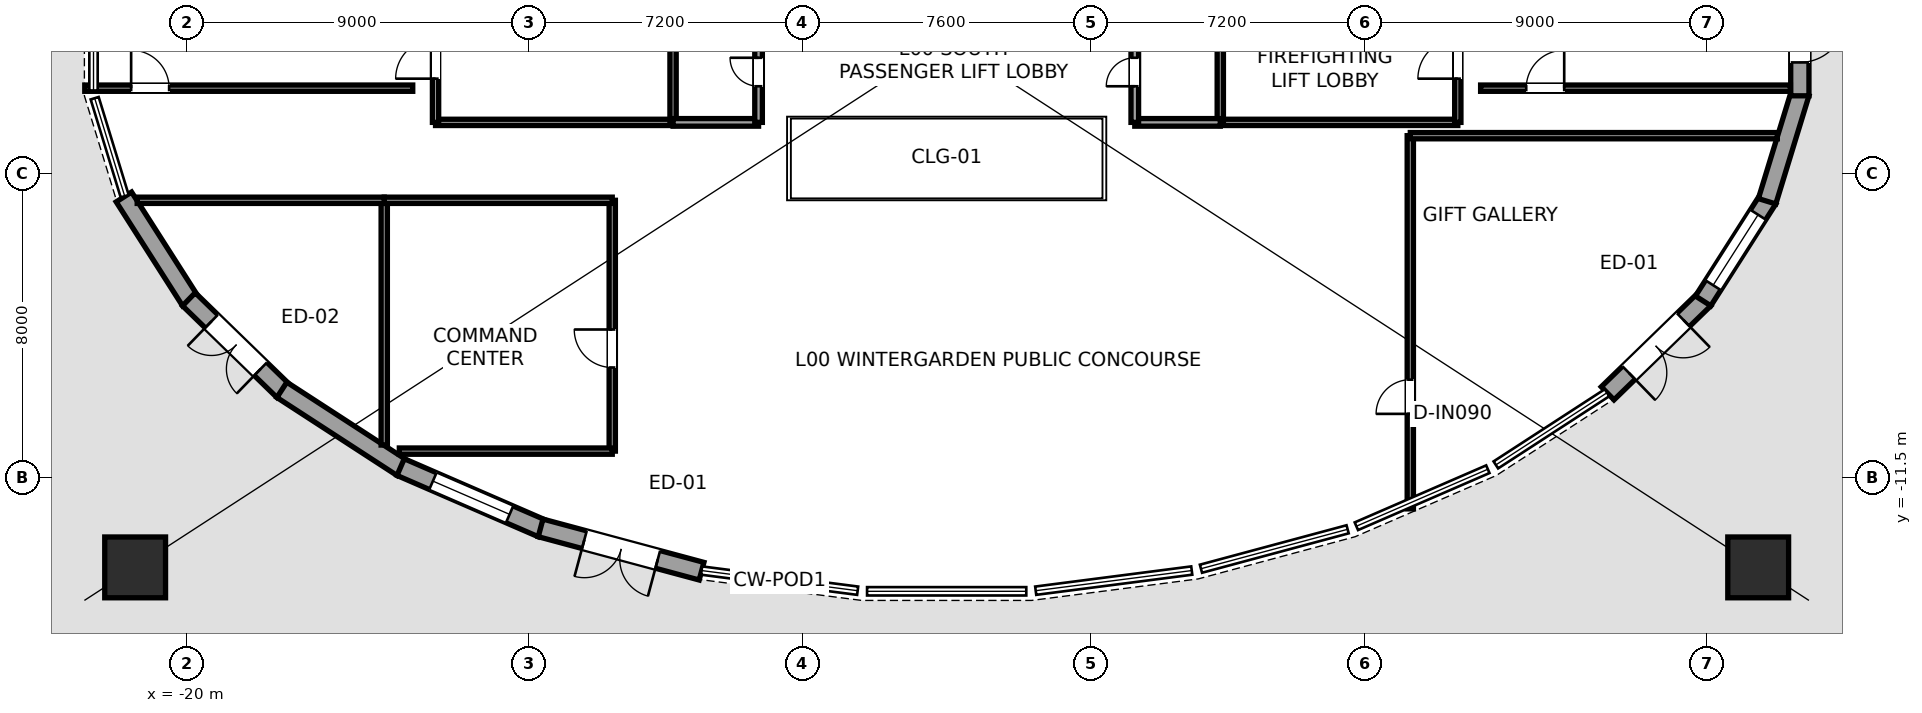
"""IFC4 building model, lengths in metres.
Left out: names, types, materials, properties, quantities, classifications, styles, units other than length and angle.
Written with IfcOpenShell. Run it as: python <this file> out.ifc"""

import sys

from ifc_helpers import new_model, si_unit, direction, frame, frame_2d, origin, origin_2d, place, context, subcontext, project, spatial, rectangle, hollow_circle, extrude, element, fill, save


model = new_model("IFC4")
c1 = context("Model", 3, precision=1e-05, world=origin(), true_north=direction((0.0, 1.0)))
c2 = subcontext(c1, "Body", "Model", "MODEL_VIEW")
j1 = project(units=[si_unit("LENGTHUNIT", "METRE"), si_unit("PLANEANGLEUNIT", "RADIAN")], contexts=[c1])
p1 = place(None, origin())
s1 = spatial("IfcSite", under=j1, at=p1, CompositionType="ELEMENT")
p2 = place(p1, origin())
s2 = spatial("IfcBuilding", under=s1, at=p2, CompositionType="ELEMENT")
p3 = place(p2, origin())
s3 = spatial("IfcBuildingStorey", under=s2, at=p3, CompositionType="ELEMENT", Elevation=0.0)
for number, where, z_axis, x_axis in (
    (1, (-21.354, -13.859, 0.0), (0.0, 0.0, 1.0), (1.0, 0.0, 0.0)),
    (2, (21.354, -13.859, 0.0), (0.0, 0.0, 1.0), (1.0, 0.0, 0.0)),
):
    element("IfcColumn", number, at=place(p3, frame(where, z_axis=z_axis, x_axis=x_axis)), inside=s3, PredefinedType="USERDEFINED", context=c2, shape_type="SweptSolid", body=[
        extrude(hollow_circle(Radius=0.8, WallThickness=0.06, at=origin_2d()), origin(), (0.0, 0.0, 1.0), 6.0),
    ])
p4 = place(p3, frame((-19.906, -6.848, 0.0), z_axis=(0.0, 0.0, 1.0), x_axis=(-0.537902363654, 0.843007145388, 0.0)))
e3 = element("IfcWall", 3, at=p4, inside=s3, PredefinedType="STANDARD", context=c2, shape_type="SweptSolid", body=[
    extrude(rectangle(XDim=3.245, YDim=0.48, at=frame_2d((1.623, 0.0))), origin(), (0.0, 0.0, 1.0), 4.913),
])
p5 = place(p3, frame((-17.458, -9.217, 0.0), z_axis=(0.0, 0.0, 1.0), x_axis=(-0.717293479468, 0.696771170696, 0.0)))
e4 = element("IfcWall", 4, at=p5, inside=s3, PredefinedType="STANDARD", context=c2, shape_type="SweptSolid", body=[
    extrude(rectangle(XDim=3.462, YDim=0.48, at=frame_2d((1.731, 0.0))), origin(), (0.0, 0.0, 1.0), 4.913),
])
p6 = place(p5, frame((0.831, 0.0, 0.0)))
e5 = element("IfcOpeningElement", 5, at=p6, cuts=e4, PredefinedType="OPENING", context=c2, shape_type="SweptSolid", body=[
    extrude(rectangle(XDim=1.8, YDim=2.3, at=frame_2d((0.9, 1.15))), frame((0.0, 0.25, 0.0), z_axis=(0.0, -1.0, 0.0), x_axis=(1.0, 0.0, 0.0)), (0.0, 0.0, 1.0), 0.5),
])
p7 = place(p3, frame((-14.333, -11.239, 0.0), z_axis=(0.0, 0.0, 1.0), x_axis=(-0.838776546814, 0.544475807098, 0.0)))
e6 = element("IfcWall", 6, at=p7, inside=s3, PredefinedType="STANDARD", context=c2, shape_type="SweptSolid", body=[
    extrude(rectangle(XDim=3.768, YDim=0.48, at=frame_2d((1.884, 0.0))), origin(), (0.0, 0.0, 1.0), 4.913),
])
p8 = place(p3, frame((-10.652, -12.832, 0.0), z_axis=(0.0, 0.0, 1.0), x_axis=(-0.917428047281, 0.3979017191, 0.0)))
e7 = element("IfcWall", 7, at=p8, inside=s3, PredefinedType="STANDARD", context=c2, shape_type="SweptSolid", body=[
    extrude(rectangle(XDim=4.051, YDim=0.48, at=frame_2d((2.025, 0.0))), origin(), (0.0, 0.0, 1.0), 4.913),
])
p9 = place(p8, frame((0.925, 0.0, 0.85)))
e8 = element("IfcOpeningElement", 8, at=p9, cuts=e7, PredefinedType="OPENING", context=c2, shape_type="SweptSolid", body=[
    extrude(rectangle(XDim=2.2, YDim=1.95, at=frame_2d((1.1, 0.975))), frame((0.0, 0.25, 0.0), z_axis=(0.0, -1.0, 0.0), x_axis=(1.0, 0.0, 0.0)), (0.0, 0.0, 1.0), 0.5),
])
p10 = place(p3, frame((-6.45, -13.959, 0.0), z_axis=(0.0, 0.0, 1.0), x_axis=(-0.965697937954, 0.259668043147, 0.0)))
e9 = element("IfcWall", 9, at=p10, inside=s3, PredefinedType="STANDARD", context=c2, shape_type="SweptSolid", body=[
    extrude(rectangle(XDim=4.386, YDim=0.48, at=frame_2d((2.193, 0.0))), origin(), (0.0, 0.0, 1.0), 4.913),
])
p11 = place(p10, frame((1.193, 0.0, 0.0)))
e10 = element("IfcOpeningElement", 10, at=p11, cuts=e9, PredefinedType="OPENING", context=c2, shape_type="SweptSolid", body=[
    extrude(rectangle(XDim=2.0, YDim=2.4, at=frame_2d((1.0, 1.2))), frame((0.0, 0.25, 0.0), z_axis=(0.0, -1.0, 0.0), x_axis=(1.0, 0.0, 0.0)), (0.0, 0.0, 1.0), 0.5),
])
p12 = place(p3, frame((19.941, -6.805, 0.0), z_axis=(0.0, 0.0, 1.0), x_axis=(-0.717307843808, -0.696756382971, 0.0)))
e11 = element("IfcWall", 11, at=p12, inside=s3, PredefinedType="STANDARD", context=c2, shape_type="SweptSolid", body=[
    extrude(rectangle(XDim=3.552, YDim=0.48, at=frame_2d((1.776, 0.0))), origin(), (0.0, 0.0, 1.0), 4.913),
])
p13 = place(p12, frame((0.776, 0.0, 0.0)))
e12 = element("IfcOpeningElement", 12, at=p13, cuts=e11, PredefinedType="OPENING", context=c2, shape_type="SweptSolid", body=[
    extrude(rectangle(XDim=2.0, YDim=2.4, at=frame_2d((1.0, 1.2))), frame((0.0, 0.25, 0.0), z_axis=(0.0, -1.0, 0.0), x_axis=(1.0, 0.0, 0.0)), (0.0, 0.0, 1.0), 0.5),
])
p14 = place(p3, frame((21.616, -4.167, 0.0), z_axis=(0.0, 0.0, 1.0), x_axis=(-0.537898487212, -0.843009618839, 0.0)))
e13 = element("IfcWall", 13, at=p14, inside=s3, PredefinedType="STANDARD", context=c2, shape_type="SweptSolid", body=[
    extrude(rectangle(XDim=3.18, YDim=0.48, at=frame_2d((1.59, 0.0))), origin(), (0.0, 0.0, 1.0), 4.913),
])
p15 = place(p14, frame((0.49, 0.0, 0.85)))
e14 = element("IfcOpeningElement", 14, at=p15, cuts=e13, PredefinedType="OPENING", context=c2, shape_type="SweptSolid", body=[
    extrude(rectangle(XDim=2.2, YDim=1.95, at=frame_2d((1.1, 0.975))), frame((0.0, 0.25, 0.0), z_axis=(0.0, -1.0, 0.0), x_axis=(1.0, 0.0, 0.0)), (0.0, 0.0, 1.0), 0.5),
])
p16 = place(p3, frame((22.461, -1.38, 0.0), z_axis=(0.0, 0.0, 1.0), x_axis=(-0.29302499195, -0.956104781963, 0.0)))
e15 = element("IfcWall", 15, at=p16, inside=s3, PredefinedType="STANDARD", context=c2, shape_type="SweptSolid", body=[
    extrude(rectangle(XDim=2.976, YDim=0.48, at=frame_2d((1.488, 0.0))), origin(), (0.0, 0.0, 1.0), 4.913),
])
p17 = place(p3, frame((22.45, 1.506, 0.0), z_axis=(0.0, 0.0, 1.0), x_axis=(0.0, -1.0, 0.0)))
e16 = element("IfcWall", 16, at=p17, inside=s3, PredefinedType="STANDARD", context=c2, shape_type="SweptSolid", body=[
    extrude(rectangle(XDim=2.956, YDim=0.48, at=frame_2d((1.478, 0.0))), origin(), (0.0, 0.0, 1.0), 4.913),
])
p18 = place(p17, frame((0.878, 0.0, 0.0)))
e17 = element("IfcOpeningElement", 17, at=p18, cuts=e16, PredefinedType="OPENING", context=c2, shape_type="SweptSolid", body=[
    extrude(rectangle(XDim=1.2, YDim=2.2, at=frame_2d((0.6, 1.1))), frame((0.0, 0.25, 0.0), z_axis=(0.0, -1.0, 0.0), x_axis=(1.0, 0.0, 0.0)), (0.0, 0.0, 1.0), 0.5),
])
p19 = place(p3, frame((-13.45, -2.15, 0.0), z_axis=(0.0, 0.0, 1.0), x_axis=(1.0, 0.0, 0.0)))
e18 = element("IfcWall", 18, at=p19, inside=s3, PredefinedType="PARTITIONING", context=c2, shape_type="SweptSolid", body=[
    extrude(rectangle(XDim=6.25, YDim=0.165, at=frame_2d((3.125, 0.0))), origin(), (0.0, 0.0, 1.0), 5.78),
])
p20 = place(p3, frame((-13.45, -2.15, 0.0), z_axis=(0.0, 0.0, 1.0), x_axis=(0.0, 1.0, 0.0)))
e19 = element("IfcWall", 19, at=p20, inside=s3, PredefinedType="PARTITIONING", context=c2, shape_type="SweptSolid", body=[
    extrude(rectangle(XDim=3.15, YDim=0.165, at=frame_2d((1.575, 0.0))), origin(), (0.0, 0.0, 1.0), 5.233),
])
p21 = place(p20, frame((1.15, 0.0, 0.0)))
e20 = element("IfcOpeningElement", 20, at=p21, cuts=e19, PredefinedType="OPENING", context=c2, shape_type="SweptSolid", body=[
    extrude(rectangle(XDim=1.05, YDim=2.15, at=frame_2d((0.525, 1.075))), frame((0.0, 0.093, 0.0), z_axis=(0.0, -1.0, 0.0), x_axis=(1.0, 0.0, 0.0)), (0.0, 0.0, 1.0), 0.185),
])
p22 = place(p3, frame((-7.2, -2.15, 0.0), z_axis=(0.0, 0.0, 1.0), x_axis=(0.0, 1.0, 0.0)))
e21 = element("IfcWall", 21, at=p22, inside=s3, PredefinedType="PARTITIONING", context=c2, shape_type="SweptSolid", body=[
    extrude(rectangle(XDim=3.15, YDim=0.165, at=frame_2d((1.575, 0.0))), origin(), (0.0, 0.0, 1.0), 5.78),
])
p23 = place(p3, frame((-7.2, -2.15, 0.0), z_axis=(0.0, 0.0, 1.0), x_axis=(1.0, 0.0, 0.0)))
e22 = element("IfcWall", 22, at=p23, inside=s3, PredefinedType="SOLIDWALL", context=c2, shape_type="SweptSolid", body=[
    extrude(rectangle(XDim=2.25, YDim=0.2, at=frame_2d((1.125, 0.0))), origin(), (0.0, 0.0, 1.0), 5.78),
])
p24 = place(p3, frame((-4.95, -2.15, 0.0), z_axis=(0.0, 0.0, 1.0), x_axis=(0.0, 1.0, 0.0)))
e23 = element("IfcWall", 23, at=p24, inside=s3, PredefinedType="SOLIDWALL", context=c2, shape_type="SweptSolid", body=[
    extrude(rectangle(XDim=3.15, YDim=0.2, at=frame_2d((1.575, 0.0))), origin(), (0.0, 0.0, 1.0), 5.148),
])
p25 = place(p24, frame((0.95, 0.0, 0.0)))
e24 = element("IfcOpeningElement", 24, at=p25, cuts=e23, PredefinedType="OPENING", context=c2, shape_type="SweptSolid", body=[
    extrude(rectangle(XDim=0.75, YDim=2.1, at=frame_2d((0.375, 1.05))), frame((0.0, 0.11, 0.0), z_axis=(0.0, -1.0, 0.0), x_axis=(1.0, 0.0, 0.0)), (0.0, 0.0, 1.0), 0.22),
])
p26 = place(p3, frame((7.2, -2.15, 0.0), z_axis=(0.0, 0.0, 1.0), x_axis=(1.0, 0.0, 0.0)))
e25 = element("IfcWall", 25, at=p26, inside=s3, PredefinedType="PARTITIONING", context=c2, shape_type="SweptSolid", body=[
    extrude(rectangle(XDim=6.25, YDim=0.165, at=frame_2d((3.125, 0.0))), origin(), (0.0, 0.0, 1.0), 5.78),
])
p27 = place(p3, frame((7.2, -2.15, 0.0), z_axis=(0.0, 0.0, 1.0), x_axis=(0.0, 1.0, 0.0)))
e26 = element("IfcWall", 26, at=p27, inside=s3, PredefinedType="PARTITIONING", context=c2, shape_type="SweptSolid", body=[
    extrude(rectangle(XDim=3.15, YDim=0.165, at=frame_2d((1.575, 0.0))), origin(), (0.0, 0.0, 1.0), 5.78),
])
p28 = place(p3, frame((13.45, -2.15, 0.0), z_axis=(0.0, 0.0, 1.0), x_axis=(0.0, 1.0, 0.0)))
e27 = element("IfcWall", 27, at=p28, inside=s3, PredefinedType="PARTITIONING", context=c2, shape_type="SweptSolid", body=[
    extrude(rectangle(XDim=3.15, YDim=0.165, at=frame_2d((1.575, 0.0))), origin(), (0.0, 0.0, 1.0), 5.233),
])
p29 = place(p28, frame((1.15, 0.0, 0.0)))
e28 = element("IfcOpeningElement", 28, at=p29, cuts=e27, PredefinedType="OPENING", context=c2, shape_type="SweptSolid", body=[
    extrude(rectangle(XDim=1.05, YDim=2.15, at=frame_2d((0.525, 1.075))), frame((0.0, 0.093, 0.0), z_axis=(0.0, -1.0, 0.0), x_axis=(1.0, 0.0, 0.0)), (0.0, 0.0, 1.0), 0.185),
])
p30 = place(p3, frame((4.95, -2.15, 0.0), z_axis=(0.0, 0.0, 1.0), x_axis=(1.0, 0.0, 0.0)))
e29 = element("IfcWall", 29, at=p30, inside=s3, PredefinedType="SOLIDWALL", context=c2, shape_type="SweptSolid", body=[
    extrude(rectangle(XDim=2.25, YDim=0.2, at=frame_2d((1.125, 0.0))), origin(), (0.0, 0.0, 1.0), 5.78),
])
p31 = place(p3, frame((4.95, -2.15, 0.0), z_axis=(0.0, 0.0, 1.0), x_axis=(0.0, 1.0, 0.0)))
e30 = element("IfcWall", 30, at=p31, inside=s3, PredefinedType="SOLIDWALL", context=c2, shape_type="SweptSolid", body=[
    extrude(rectangle(XDim=3.15, YDim=0.2, at=frame_2d((1.575, 0.0))), origin(), (0.0, 0.0, 1.0), 5.148),
])
p32 = place(p31, frame((0.95, 0.0, 0.0)))
e31 = element("IfcOpeningElement", 31, at=p32, cuts=e30, PredefinedType="OPENING", context=c2, shape_type="SweptSolid", body=[
    extrude(rectangle(XDim=0.75, YDim=2.1, at=frame_2d((0.375, 1.05))), frame((0.0, 0.11, 0.0), z_axis=(0.0, -1.0, 0.0), x_axis=(1.0, 0.0, 0.0)), (0.0, 0.0, 1.0), 0.22),
])
p33 = place(p3, frame((-14.8, -10.641, 0.0), z_axis=(0.0, 0.0, 1.0), x_axis=(0.0, 1.0, 0.0)))
e32 = element("IfcWall", 32, at=p33, inside=s3, PredefinedType="PARTITIONING", context=c2, shape_type="SweptSolid", body=[
    extrude(rectangle(XDim=6.441, YDim=0.165, at=frame_2d((3.22, 0.0))), origin(), (0.0, 0.0, 1.0), 5.233),
])
p34 = place(p3, frame((-8.8, -10.8, 0.0), z_axis=(0.0, 0.0, 1.0), x_axis=(0.0, 1.0, 0.0)))
e33 = element("IfcWall", 33, at=p34, inside=s3, PredefinedType="PARTITIONING", context=c2, shape_type="SweptSolid", body=[
    extrude(rectangle(XDim=6.6, YDim=0.165, at=frame_2d((3.3, 0.0))), origin(), (0.0, 0.0, 1.0), 5.78),
])
p35 = place(p34, frame((2.2, 0.0, 0.0)))
e34 = element("IfcOpeningElement", 34, at=p35, cuts=e33, PredefinedType="OPENING", context=c2, shape_type="SweptSolid", body=[
    extrude(rectangle(XDim=1.0, YDim=2.15, at=frame_2d((0.5, 1.075))), frame((0.0, 0.093, 0.0), z_axis=(0.0, -1.0, 0.0), x_axis=(1.0, 0.0, 0.0)), (0.0, 0.0, 1.0), 0.185),
])
p36 = place(p3, frame((-14.403, -10.8, 0.0), z_axis=(0.0, 0.0, 1.0), x_axis=(1.0, 0.0, 0.0)))
e35 = element("IfcWall", 35, at=p36, inside=s3, PredefinedType="PARTITIONING", context=c2, shape_type="SweptSolid", body=[
    extrude(rectangle(XDim=5.603, YDim=0.165, at=frame_2d((2.802, 0.0))), origin(), (0.0, 0.0, 1.0), 5.78),
])
p37 = place(p3, frame((-14.8, -4.2, 0.0), z_axis=(0.0, 0.0, 1.0), x_axis=(1.0, 0.0, 0.0)))
e36 = element("IfcWall", 36, at=p37, inside=s3, PredefinedType="PARTITIONING", context=c2, shape_type="SweptSolid", body=[
    extrude(rectangle(XDim=6.0, YDim=0.165, at=frame_2d((3.0, 0.0))), origin(), (0.0, 0.0, 1.0), 5.307),
])
p38 = place(p3, frame((-21.301, -4.2, 0.0), z_axis=(0.0, 0.0, 1.0), x_axis=(1.0, 0.0, 0.0)))
e37 = element("IfcWall", 37, at=p38, inside=s3, PredefinedType="PARTITIONING", context=c2, shape_type="SweptSolid", body=[
    extrude(rectangle(XDim=6.501, YDim=0.165, at=frame_2d((3.25, 0.0))), origin(), (0.0, 0.0, 1.0), 5.233),
])
p39 = place(p3, frame((12.2, -12.32, 0.0), z_axis=(0.0, 0.0, 1.0), x_axis=(0.0, 1.0, 0.0)))
e38 = element("IfcWall", 38, at=p39, inside=s3, PredefinedType="PARTITIONING", context=c2, shape_type="SweptSolid", body=[
    extrude(rectangle(XDim=9.82, YDim=0.165, at=frame_2d((4.91, 0.0))), origin(), (0.0, 0.0, 1.0), 5.78),
])
p40 = place(p39, frame((2.5, 0.0, 0.0)))
e39 = element("IfcOpeningElement", 39, at=p40, cuts=e38, PredefinedType="OPENING", context=c2, shape_type="SweptSolid", body=[
    extrude(rectangle(XDim=0.9, YDim=2.1, at=frame_2d((0.45, 1.05))), frame((0.0, 0.093, 0.0), z_axis=(0.0, -1.0, 0.0), x_axis=(1.0, 0.0, 0.0)), (0.0, 0.0, 1.0), 0.185),
])
p41 = place(p3, frame((12.2, -2.5, 0.0), z_axis=(0.0, 0.0, 1.0), x_axis=(1.0, 0.0, 0.0)))
e40 = element("IfcWall", 40, at=p41, inside=s3, PredefinedType="PARTITIONING", context=c2, shape_type="SweptSolid", body=[
    extrude(rectangle(XDim=9.658, YDim=0.165, at=frame_2d((4.829, 0.0))), origin(), (0.0, 0.0, 1.0), 5.233),
])
p42 = place(p3, frame((-22.68, -1.25, 0.0), z_axis=(0.0, 0.0, 1.0), x_axis=(1.0, 0.0, 0.0)))
e41 = element("IfcWall", 41, at=p42, inside=s3, PredefinedType="PARTITIONING", context=c2, shape_type="SweptSolid", body=[
    extrude(rectangle(XDim=8.63, YDim=0.165, at=frame_2d((4.315, 0.0))), origin(), (0.0, 0.0, 1.0), 5.148),
])
p43 = place(p42, frame((1.22, 0.0, 0.0)))
e42 = element("IfcOpeningElement", 42, at=p43, cuts=e41, PredefinedType="OPENING", context=c2, shape_type="SweptSolid", body=[
    extrude(rectangle(XDim=1.0, YDim=2.15, at=frame_2d((0.5, 1.075))), frame((0.0, 0.093, 0.0), z_axis=(0.0, -1.0, 0.0), x_axis=(1.0, 0.0, 0.0)), (0.0, 0.0, 1.0), 0.185),
])
p44 = place(p3, frame((14.05, -1.25, 0.0), z_axis=(0.0, 0.0, 1.0), x_axis=(1.0, 0.0, 0.0)))
e43 = element("IfcWall", 43, at=p44, inside=s3, PredefinedType="PARTITIONING", context=c2, shape_type="SweptSolid", body=[
    extrude(rectangle(XDim=8.152, YDim=0.165, at=frame_2d((4.076, 0.0))), origin(), (0.0, 0.0, 1.0), 5.148),
])
p45 = place(p44, frame((1.2, 0.0, 0.0)))
e44 = element("IfcOpeningElement", 44, at=p45, cuts=e43, PredefinedType="OPENING", context=c2, shape_type="SweptSolid", body=[
    extrude(rectangle(XDim=1.0, YDim=2.15, at=frame_2d((0.5, 1.075))), frame((0.0, 0.093, 0.0), z_axis=(0.0, -1.0, 0.0), x_axis=(1.0, 0.0, 0.0)), (0.0, 0.0, 1.0), 0.185),
])
p46 = place(p6, origin())
e45 = element("IfcDoor", 45, at=p46, inside=s3, OperationType="DOUBLE_DOOR_SINGLE_SWING", PredefinedType="DOOR", context=c2, shape_type="SweptSolid", body=[
    extrude(rectangle(XDim=1.8, YDim=2.3, at=frame_2d((0.9, 1.15))), frame((0.0, 0.025, 0.0), z_axis=(0.0, -1.0, 0.0), x_axis=(1.0, 0.0, 0.0)), (0.0, 0.0, 1.0), 0.05),
])
fill(e5, e45)
p47 = place(p9, origin())
e46 = element("IfcWindow", 46, at=p47, inside=s3, PartitioningType="SINGLE_PANEL", PredefinedType="WINDOW", context=c2, shape_type="SweptSolid", body=[
    extrude(rectangle(XDim=2.2, YDim=1.95, at=frame_2d((1.1, 0.975))), frame((0.0, -0.01, 0.0), z_axis=(0.0, -1.0, 0.0), x_axis=(1.0, 0.0, 0.0)), (0.0, 0.0, 1.0), 0.06),
])
fill(e8, e46)
p48 = place(p11, origin())
e47 = element("IfcDoor", 47, at=p48, inside=s3, OperationType="DOUBLE_DOOR_DOUBLE_SWING", PredefinedType="DOOR", context=c2, shape_type="SweptSolid", body=[
    extrude(rectangle(XDim=2.0, YDim=2.4, at=frame_2d((1.0, 1.2))), frame((0.0, 0.025, 0.0), z_axis=(0.0, -1.0, 0.0), x_axis=(1.0, 0.0, 0.0)), (0.0, 0.0, 1.0), 0.05),
])
fill(e10, e47)
p49 = place(p13, origin())
e48 = element("IfcDoor", 48, at=p49, inside=s3, OperationType="DOUBLE_DOOR_DOUBLE_SWING", PredefinedType="DOOR", context=c2, shape_type="SweptSolid", body=[
    extrude(rectangle(XDim=2.0, YDim=2.4, at=frame_2d((1.0, 1.2))), frame((0.0, 0.025, 0.0), z_axis=(0.0, -1.0, 0.0), x_axis=(1.0, 0.0, 0.0)), (0.0, 0.0, 1.0), 0.05),
])
fill(e12, e48)
p50 = place(p15, origin())
e49 = element("IfcWindow", 49, at=p50, inside=s3, PartitioningType="SINGLE_PANEL", PredefinedType="WINDOW", context=c2, shape_type="SweptSolid", body=[
    extrude(rectangle(XDim=2.2, YDim=1.95, at=frame_2d((1.1, 0.975))), frame((0.0, -0.01, 0.0), z_axis=(0.0, -1.0, 0.0), x_axis=(1.0, 0.0, 0.0)), (0.0, 0.0, 1.0), 0.06),
])
fill(e14, e49)
p51 = place(p18, origin())
e50 = element("IfcDoor", 50, at=p51, inside=s3, OperationType="SINGLE_SWING_LEFT", PredefinedType="DOOR", context=c2, shape_type="SweptSolid", body=[
    extrude(rectangle(XDim=1.2, YDim=2.2, at=frame_2d((0.6, 1.1))), frame((0.0, 0.025, 0.0), z_axis=(0.0, -1.0, 0.0), x_axis=(1.0, 0.0, 0.0)), (0.0, 0.0, 1.0), 0.05),
])
fill(e17, e50)
p52 = place(p21, origin())
e51 = element("IfcDoor", 51, at=p52, inside=s3, OperationType="SINGLE_SWING_LEFT", PredefinedType="DOOR", context=c2, shape_type="SweptSolid", body=[
    extrude(rectangle(XDim=1.05, YDim=2.15, at=frame_2d((0.525, 1.075))), frame((0.0, 0.025, 0.0), z_axis=(0.0, -1.0, 0.0), x_axis=(1.0, 0.0, 0.0)), (0.0, 0.0, 1.0), 0.05),
])
fill(e20, e51)
p53 = place(p25, origin())
e52 = element("IfcDoor", 52, at=p53, inside=s3, OperationType="SINGLE_SWING_RIGHT", PredefinedType="DOOR", context=c2, shape_type="SweptSolid", body=[
    extrude(rectangle(XDim=0.75, YDim=2.1, at=frame_2d((0.375, 1.05))), frame((0.0, 0.025, 0.0), z_axis=(0.0, -1.0, 0.0), x_axis=(1.0, 0.0, 0.0)), (0.0, 0.0, 1.0), 0.05),
])
fill(e24, e52)
p54 = place(p29, origin())
e53 = element("IfcDoor", 53, at=p54, inside=s3, OperationType="SINGLE_SWING_LEFT", PredefinedType="DOOR", context=c2, shape_type="SweptSolid", body=[
    extrude(rectangle(XDim=1.05, YDim=2.15, at=frame_2d((0.525, 1.075))), frame((0.0, 0.025, 0.0), z_axis=(0.0, -1.0, 0.0), x_axis=(1.0, 0.0, 0.0)), (0.0, 0.0, 1.0), 0.05),
])
fill(e28, e53)
p55 = place(p32, origin())
e54 = element("IfcDoor", 54, at=p55, inside=s3, OperationType="SINGLE_SWING_LEFT", PredefinedType="DOOR", context=c2, shape_type="SweptSolid", body=[
    extrude(rectangle(XDim=0.75, YDim=2.1, at=frame_2d((0.375, 1.05))), frame((0.0, 0.025, 0.0), z_axis=(0.0, -1.0, 0.0), x_axis=(1.0, 0.0, 0.0)), (0.0, 0.0, 1.0), 0.05),
])
fill(e31, e54)
p56 = place(p35, origin())
e55 = element("IfcDoor", 55, at=p56, inside=s3, OperationType="SINGLE_SWING_RIGHT", PredefinedType="DOOR", context=c2, shape_type="SweptSolid", body=[
    extrude(rectangle(XDim=1.0, YDim=2.15, at=frame_2d((0.5, 1.075))), frame((0.0, 0.025, 0.0), z_axis=(0.0, -1.0, 0.0), x_axis=(1.0, 0.0, 0.0)), (0.0, 0.0, 1.0), 0.05),
])
fill(e34, e55)
p57 = place(p40, origin())
e56 = element("IfcDoor", 56, at=p57, inside=s3, OperationType="SINGLE_SWING_LEFT", PredefinedType="DOOR", context=c2, shape_type="SweptSolid", body=[
    extrude(rectangle(XDim=0.9, YDim=2.1, at=frame_2d((0.45, 1.05))), frame((0.0, 0.025, 0.0), z_axis=(0.0, -1.0, 0.0), x_axis=(1.0, 0.0, 0.0)), (0.0, 0.0, 1.0), 0.05),
])
fill(e39, e56)
p58 = place(p45, origin())
e57 = element("IfcDoor", 57, at=p58, inside=s3, OperationType="SINGLE_SWING_RIGHT", PredefinedType="DOOR", context=c2, shape_type="SweptSolid", body=[
    extrude(rectangle(XDim=1.0, YDim=2.15, at=frame_2d((0.5, 1.075))), frame((0.0, 0.025, 0.0), z_axis=(0.0, -1.0, 0.0), x_axis=(1.0, 0.0, 0.0)), (0.0, 0.0, 1.0), 0.05),
])
fill(e44, e57)
p59 = place(p43, origin())
e58 = element("IfcDoor", 58, at=p59, inside=s3, OperationType="SINGLE_SWING_LEFT", PredefinedType="DOOR", context=c2, shape_type="SweptSolid", body=[
    extrude(rectangle(XDim=1.0, YDim=2.15, at=frame_2d((0.5, 1.075))), frame((0.0, 0.025, 0.0), z_axis=(0.0, -1.0, 0.0), x_axis=(1.0, 0.0, 0.0)), (0.0, 0.0, 1.0), 0.05),
])
fill(e42, e58)
save(model, sys.argv[1])
